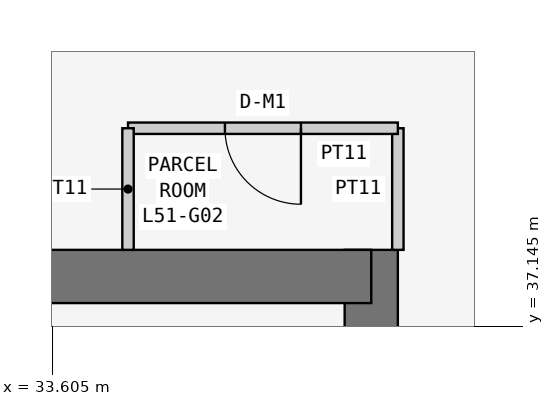
"""IFC4 building model, lengths in metres.
Left out: names, types, materials, properties, quantities, classifications, styles, units other than length and angle.
Written with IfcOpenShell. Run it as: python <this file> out.ifc"""

import sys

from ifc_helpers import new_model, si_unit, direction, frame, frame_2d, origin, place, context, subcontext, project, spatial, rectangle, extrude, element, fill, save


model = new_model("IFC4")
c1 = context("Model", 3, precision=1e-05, world=origin(), true_north=direction((0.0, 1.0)))
c2 = subcontext(c1, "Body", "Model", "MODEL_VIEW")
j1 = project(units=[si_unit("LENGTHUNIT", "METRE"), si_unit("PLANEANGLEUNIT", "RADIAN")], contexts=[c1])
p1 = place(None, origin())
s1 = spatial("IfcSite", under=j1, at=p1, CompositionType="ELEMENT")
p2 = place(p1, origin())
s2 = spatial("IfcBuilding", under=s1, at=p2, CompositionType="ELEMENT")
p3 = place(p2, frame((0.0, 0.0, 197.7)))
s3 = spatial("IfcBuildingStorey", under=s2, at=p3, CompositionType="ELEMENT", Elevation=197.7)
p4 = place(p3, frame((37.8, 21.0, 0.0), z_axis=(0.0, 0.0, 1.0), x_axis=(0.0, 1.0, 0.0)))
e1 = element("IfcWall", 1, at=p4, inside=s3, PredefinedType="SHEAR", context=c2, shape_type="SweptSolid", body=[
    extrude(rectangle(XDim=17.15, YDim=0.7, at=frame_2d((8.575, 0.0))), origin(), (0.0, 0.0, 1.0), 3.6),
])
p5 = place(p4, frame((5.2, 0.0, 0.0)))
e2 = element("IfcOpeningElement", 2, at=p5, cuts=e1, PredefinedType="OPENING", context=c2, shape_type="SweptSolid", body=[
    extrude(rectangle(XDim=1.2, YDim=2.1, at=frame_2d((0.6, 1.05))), frame((0.0, 0.36, 0.0), z_axis=(0.0, -1.0, 0.0), x_axis=(1.0, 0.0, 0.0)), (0.0, 0.0, 1.0), 0.72),
])
p6 = place(p3, frame((37.8, 37.8, 0.0), z_axis=(0.0, 0.0, 1.0), x_axis=(-1.0, 0.0, 0.0)))
e3 = element("IfcWall", 3, at=p6, inside=s3, PredefinedType="SHEAR", context=c2, shape_type="SweptSolid", body=[
    extrude(rectangle(XDim=17.15, YDim=0.7, at=frame_2d((8.575, 0.0))), origin(), (0.0, 0.0, 1.0), 3.6),
])
p7 = place(p3, frame((38.15, 38.15, 0.0), z_axis=(0.0, 0.0, 1.0), x_axis=(0.0, 1.0, 0.0)))
e4 = element("IfcWall", 4, at=p7, inside=s3, PredefinedType="PARTITIONING", context=c2, shape_type="SweptSolid", body=[
    extrude(rectangle(XDim=1.6, YDim=0.15, at=frame_2d((0.8, 0.0))), origin(), (0.0, 0.0, 1.0), 3.45),
])
p8 = place(p3, frame((38.15, 39.75, 0.0), z_axis=(0.0, 0.0, 1.0), x_axis=(-1.0, 0.0, 0.0)))
e5 = element("IfcWall", 5, at=p8, inside=s3, PredefinedType="PARTITIONING", context=c2, shape_type="SweptSolid", body=[
    extrude(rectangle(XDim=3.55, YDim=0.15, at=frame_2d((1.775, 0.0))), origin(), (0.0, 0.0, 1.0), 3.45),
])
p9 = place(p8, frame((1.275, 0.0, 0.0)))
e6 = element("IfcOpeningElement", 6, at=p9, cuts=e5, PredefinedType="OPENING", context=c2, shape_type="SweptSolid", body=[
    extrude(rectangle(XDim=1.0, YDim=2.1, at=frame_2d((0.5, 1.05))), frame((0.0, 0.085, 0.0), z_axis=(0.0, -1.0, 0.0), x_axis=(1.0, 0.0, 0.0)), (0.0, 0.0, 1.0), 0.17),
])
p10 = place(p3, frame((34.6, 39.75, 0.0), z_axis=(0.0, 0.0, 1.0), x_axis=(0.0, -1.0, 0.0)))
e7 = element("IfcWall", 7, at=p10, inside=s3, PredefinedType="PARTITIONING", context=c2, shape_type="SweptSolid", body=[
    extrude(rectangle(XDim=1.6, YDim=0.15, at=frame_2d((0.8, 0.0))), origin(), (0.0, 0.0, 1.0), 3.45),
])
p11 = place(p9, origin())
e8 = element("IfcDoor", 8, at=p11, inside=s3, OperationType="SINGLE_SWING_LEFT", PredefinedType="DOOR", context=c2, shape_type="SweptSolid", body=[
    extrude(rectangle(XDim=1.0, YDim=2.1, at=frame_2d((0.5, 1.05))), frame((0.0, 0.025, 0.0), z_axis=(0.0, -1.0, 0.0), x_axis=(1.0, 0.0, 0.0)), (0.0, 0.0, 1.0), 0.05),
])
fill(e6, e8)
save(model, sys.argv[1])
